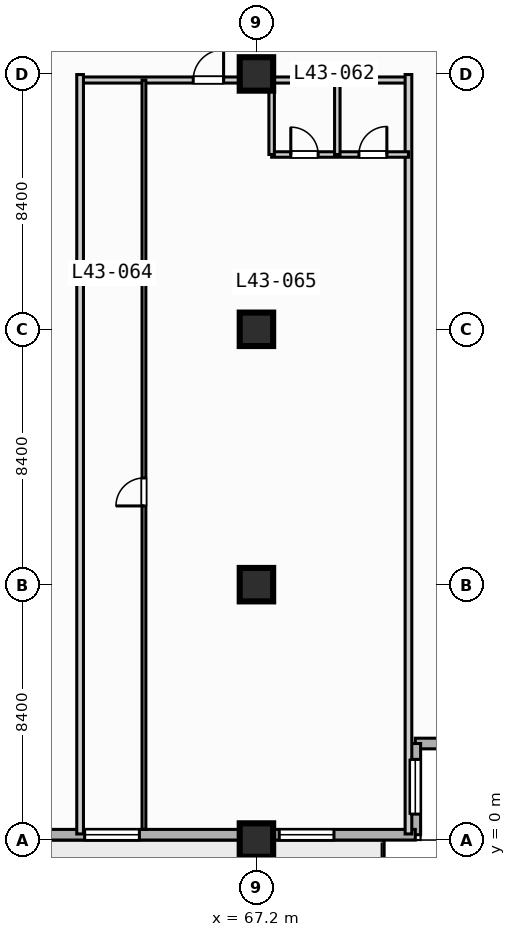
"""IFC4 building model, lengths in metres.
Left out: names, types, materials, properties, quantities, classifications, styles, units other than length and angle.
Written with IfcOpenShell. Run it as: python <this file> out.ifc"""

import sys

from ifc_helpers import new_model, si_unit, direction, frame, frame_2d, origin, origin_2d, place, context, subcontext, project, spatial, rectangle, extrude, element, fill, save


model = new_model("IFC4")
c1 = context("Model", 3, precision=1e-05, world=origin(), true_north=direction((0.0, 1.0)))
c2 = subcontext(c1, "Body", "Model", "MODEL_VIEW")
j1 = project(units=[si_unit("LENGTHUNIT", "METRE"), si_unit("PLANEANGLEUNIT", "RADIAN")], contexts=[c1])
p1 = place(None, origin())
s1 = spatial("IfcSite", under=j1, at=p1, CompositionType="ELEMENT")
p2 = place(p1, origin())
s2 = spatial("IfcBuilding", under=s1, at=p2, CompositionType="ELEMENT")
p3 = place(p2, frame((0.0, 0.0, 179.1)))
s3 = spatial("IfcBuildingStorey", under=s2, at=p3, CompositionType="ELEMENT", Elevation=179.1)
for number, where, z_axis, x_axis in (
    (1, (67.2, 0.0, 0.0), (0.0, 0.0, 1.0), (1.0, 0.0, 0.0)),
    (2, (67.2, 8.4, 0.0), (0.0, 0.0, 1.0), (1.0, 0.0, 0.0)),
    (3, (67.2, 16.8, 0.0), (0.0, 0.0, 1.0), (1.0, 0.0, 0.0)),
    (4, (67.2, 25.2, 0.0), (0.0, 0.0, 1.0), (1.0, 0.0, 0.0)),
):
    element("IfcColumn", number, at=place(p3, frame(where, z_axis=z_axis, x_axis=x_axis)), inside=s3, PredefinedType="COLUMN", context=c2, shape_type="SweptSolid", body=[
        extrude(rectangle(XDim=1.1, YDim=1.1, at=origin_2d()), origin(), (0.0, 0.0, 1.0), 3.7),
    ])
p4 = place(p3, frame((75.425, 3.175, 0.0), z_axis=(0.0, 0.0, 1.0), x_axis=(-1.0, 0.0, 0.0)))
e5 = element("IfcWall", 5, at=p4, inside=s3, PredefinedType="STANDARD", context=c2, shape_type="SweptSolid", body=[
    extrude(rectangle(XDim=3.0, YDim=0.35, at=frame_2d((1.5, 0.0))), origin(), (0.0, 0.0, 1.0), 3.47),
])
p5 = place(p3, frame((72.425, 3.175, 0.0), z_axis=(0.0, 0.0, 1.0), x_axis=(0.0, -1.0, 0.0)))
e6 = element("IfcWall", 6, at=p5, inside=s3, PredefinedType="STANDARD", context=c2, shape_type="SweptSolid", body=[
    extrude(rectangle(XDim=3.0, YDim=0.35, at=frame_2d((1.5, 0.0))), origin(), (0.0, 0.0, 1.0), 3.47),
])
p6 = place(p5, frame((0.522, 0.0, 0.85)))
e7 = element("IfcOpeningElement", 7, at=p6, cuts=e6, PredefinedType="OPENING", context=c2, shape_type="SweptSolid", body=[
    extrude(rectangle(XDim=1.8, YDim=1.8, at=frame_2d((0.9, 0.9))), frame((0.0, 0.185, 0.0), z_axis=(0.0, -1.0, 0.0), x_axis=(1.0, 0.0, 0.0)), (0.0, 0.0, 1.0), 0.37),
])
p7 = place(p3, frame((72.425, 0.175, 0.0), z_axis=(0.0, 0.0, 1.0), x_axis=(-1.0, 0.0, 0.0)))
e8 = element("IfcWall", 8, at=p7, inside=s3, PredefinedType="STANDARD", context=c2, shape_type="SweptSolid", body=[
    extrude(rectangle(XDim=69.25, YDim=0.35, at=frame_2d((34.625, 0.0))), origin(), (0.0, 0.0, 1.0), 3.47),
])
p8 = place(p7, frame((50.725, 0.0, 0.0)))
e9 = element("IfcOpeningElement", 9, at=p8, cuts=e8, PredefinedType="OPENING", context=c2, shape_type="SweptSolid", body=[
    extrude(rectangle(XDim=1.4, YDim=2.2, at=frame_2d((0.7, 1.1))), frame((0.0, 0.185, 0.0), z_axis=(0.0, -1.0, 0.0), x_axis=(1.0, 0.0, 0.0)), (0.0, 0.0, 1.0), 0.37),
])
p9 = place(p7, frame((58.625, 0.0, 0.85)))
e10 = element("IfcOpeningElement", 10, at=p9, cuts=e8, PredefinedType="OPENING", context=c2, shape_type="SweptSolid", body=[
    extrude(rectangle(XDim=2.4, YDim=1.95, at=frame_2d((1.2, 0.975))), frame((0.0, 0.185, 0.0), z_axis=(0.0, -1.0, 0.0), x_axis=(1.0, 0.0, 0.0)), (0.0, 0.0, 1.0), 0.37),
])
p10 = place(p7, frame((41.825, 0.0, 0.85)))
e11 = element("IfcOpeningElement", 11, at=p10, cuts=e8, PredefinedType="OPENING", context=c2, shape_type="SweptSolid", body=[
    extrude(rectangle(XDim=2.4, YDim=1.95, at=frame_2d((1.2, 0.975))), frame((0.0, 0.185, 0.0), z_axis=(0.0, -1.0, 0.0), x_axis=(1.0, 0.0, 0.0)), (0.0, 0.0, 1.0), 0.37),
])
p11 = place(p7, frame((33.725, 0.0, 0.85)))
e12 = element("IfcOpeningElement", 12, at=p11, cuts=e8, PredefinedType="OPENING", context=c2, shape_type="SweptSolid", body=[
    extrude(rectangle(XDim=1.8, YDim=1.8, at=frame_2d((0.9, 0.9))), frame((0.0, 0.185, 0.0), z_axis=(0.0, -1.0, 0.0), x_axis=(1.0, 0.0, 0.0)), (0.0, 0.0, 1.0), 0.37),
])
p12 = place(p7, frame((25.025, 0.0, 0.85)))
e13 = element("IfcOpeningElement", 13, at=p12, cuts=e8, PredefinedType="OPENING", context=c2, shape_type="SweptSolid", body=[
    extrude(rectangle(XDim=2.4, YDim=1.95, at=frame_2d((1.2, 0.975))), frame((0.0, 0.185, 0.0), z_axis=(0.0, -1.0, 0.0), x_axis=(1.0, 0.0, 0.0)), (0.0, 0.0, 1.0), 0.37),
])
p13 = place(p7, frame((67.075, 0.0, 0.85)))
e14 = element("IfcOpeningElement", 14, at=p13, cuts=e8, PredefinedType="OPENING", context=c2, shape_type="SweptSolid", body=[
    extrude(rectangle(XDim=1.8, YDim=1.8, at=frame_2d((0.9, 0.9))), frame((0.0, 0.185, 0.0), z_axis=(0.0, -1.0, 0.0), x_axis=(1.0, 0.0, 0.0)), (0.0, 0.0, 1.0), 0.37),
])
p14 = place(p7, frame((56.39, 0.0, 0.85)))
e15 = element("IfcOpeningElement", 15, at=p14, cuts=e8, PredefinedType="OPENING", context=c2, shape_type="SweptSolid", body=[
    extrude(rectangle(XDim=0.72, YDim=1.8, at=frame_2d((0.36, 0.9))), frame((0.0, 0.185, 0.0), z_axis=(0.0, -1.0, 0.0), x_axis=(1.0, 0.0, 0.0)), (0.0, 0.0, 1.0), 0.37),
])
p15 = place(p7, frame((9.075, 0.0, 0.85)))
e16 = element("IfcOpeningElement", 16, at=p15, cuts=e8, PredefinedType="OPENING", context=c2, shape_type="SweptSolid", body=[
    extrude(rectangle(XDim=1.8, YDim=1.8, at=frame_2d((0.9, 0.9))), frame((0.0, 0.185, 0.0), z_axis=(0.0, -1.0, 0.0), x_axis=(1.0, 0.0, 0.0)), (0.0, 0.0, 1.0), 0.37),
])
p16 = place(p7, frame((2.675, 0.0, 0.85)))
e17 = element("IfcOpeningElement", 17, at=p16, cuts=e8, PredefinedType="OPENING", context=c2, shape_type="SweptSolid", body=[
    extrude(rectangle(XDim=1.8, YDim=1.8, at=frame_2d((0.9, 0.9))), frame((0.0, 0.185, 0.0), z_axis=(0.0, -1.0, 0.0), x_axis=(1.0, 0.0, 0.0)), (0.0, 0.0, 1.0), 0.37),
])
p17 = place(p3, frame((61.4, 25.0, 0.0), z_axis=(0.0, 0.0, 1.0), x_axis=(1.0, 0.0, 0.0)))
e18 = element("IfcWall", 18, at=p17, inside=s3, PredefinedType="PARTITIONING", context=c2, shape_type="SweptSolid", body=[
    extrude(rectangle(XDim=10.8, YDim=0.2, at=frame_2d((5.4, 0.0))), origin(), (0.0, 0.0, 1.0), 2.82),
])
p18 = place(p17, frame((3.72, 0.0, 0.0)))
e19 = element("IfcOpeningElement", 19, at=p18, cuts=e18, PredefinedType="OPENING", context=c2, shape_type="SweptSolid", body=[
    extrude(rectangle(XDim=1.0, YDim=2.15, at=frame_2d((0.5, 1.075))), frame((0.0, 0.11, 0.0), z_axis=(0.0, -1.0, 0.0), x_axis=(1.0, 0.0, 0.0)), (0.0, 0.0, 1.0), 0.22),
])
for number, where, z_axis, x_axis in (
    (20, (61.4, 0.2, 0.0), (0.0, 0.0, 1.0), (0.0, 1.0, 0.0)),
    (21, (72.2, 0.2, 0.0), (0.0, 0.0, 1.0), (0.0, 1.0, 0.0)),
):
    element("IfcWall", number, at=place(p3, frame(where, z_axis=z_axis, x_axis=x_axis)), inside=s3, PredefinedType="PARTITIONING", context=c2, shape_type="SweptSolid", body=[
        extrude(rectangle(XDim=24.98, YDim=0.22, at=frame_2d((12.49, 0.0))), origin(), (0.0, 0.0, 1.0), 3.47),
    ])
p19 = place(p3, frame((67.7, 22.55, 0.0), z_axis=(0.0, 0.0, 1.0), x_axis=(1.0, 0.0, 0.0)))
e22 = element("IfcWall", 22, at=p19, inside=s3, PredefinedType="PLUMBINGWALL", context=c2, shape_type="SweptSolid", body=[
    extrude(rectangle(XDim=4.5, YDim=0.18, at=frame_2d((2.25, 0.0))), origin(), (0.0, 0.0, 1.0), 3.47),
])
p20 = place(p19, frame((0.63, 0.0, 0.0)))
e23 = element("IfcOpeningElement", 23, at=p20, cuts=e22, PredefinedType="OPENING", context=c2, shape_type="SweptSolid", body=[
    extrude(rectangle(XDim=0.9, YDim=2.1, at=frame_2d((0.45, 1.05))), frame((0.0, 0.1, 0.0), z_axis=(0.0, -1.0, 0.0), x_axis=(1.0, 0.0, 0.0)), (0.0, 0.0, 1.0), 0.2),
])
p21 = place(p19, frame((2.87, 0.0, 0.0)))
e24 = element("IfcOpeningElement", 24, at=p21, cuts=e22, PredefinedType="OPENING", context=c2, shape_type="SweptSolid", body=[
    extrude(rectangle(XDim=0.92, YDim=2.1, at=frame_2d((0.46, 1.05))), frame((0.0, 0.1, 0.0), z_axis=(0.0, -1.0, 0.0), x_axis=(1.0, 0.0, 0.0)), (0.0, 0.0, 1.0), 0.2),
])
for number, where, z_axis, x_axis in (
    (25, (67.7, 22.55, 0.0), (0.0, 0.0, 1.0), (0.0, 1.0, 0.0)),
    (26, (69.86, 22.55, 0.0), (0.0, 0.0, 1.0), (0.0, 1.0, 0.0)),
):
    element("IfcWall", number, at=place(p3, frame(where, z_axis=z_axis, x_axis=x_axis)), inside=s3, PredefinedType="PLUMBINGWALL", context=c2, shape_type="SweptSolid", body=[
        extrude(rectangle(XDim=2.45, YDim=0.18, at=frame_2d((1.225, 0.0))), origin(), (0.0, 0.0, 1.0), 3.47),
    ])
p22 = place(p3, frame((63.5, 0.35, 0.0), z_axis=(0.0, 0.0, 1.0), x_axis=(0.0, 1.0, 0.0)))
e27 = element("IfcWall", 27, at=p22, inside=s3, PredefinedType="PARTITIONING", context=c2, shape_type="SweptSolid", body=[
    extrude(rectangle(XDim=24.65, YDim=0.125, at=frame_2d((12.325, 0.0))), origin(), (0.0, 0.0, 1.0), 3.47),
])
p23 = place(p22, frame((10.64, 0.0, 0.0)))
e28 = element("IfcOpeningElement", 28, at=p23, cuts=e27, PredefinedType="OPENING", context=c2, shape_type="SweptSolid", body=[
    extrude(rectangle(XDim=0.92, YDim=2.1, at=frame_2d((0.46, 1.05))), frame((0.0, 0.073, 0.0), z_axis=(0.0, -1.0, 0.0), x_axis=(1.0, 0.0, 0.0)), (0.0, 0.0, 1.0), 0.145),
])
p24 = place(p6, origin())
e29 = element("IfcWindow", 29, at=p24, inside=s3, PartitioningType="SINGLE_PANEL", PredefinedType="WINDOW", context=c2, shape_type="SweptSolid", body=[
    extrude(rectangle(XDim=1.8, YDim=1.8, at=frame_2d((0.9, 0.9))), frame((0.0, 0.03, 0.0), z_axis=(0.0, -1.0, 0.0), x_axis=(1.0, 0.0, 0.0)), (0.0, 0.0, 1.0), 0.06),
])
fill(e7, e29)
p25 = place(p15, origin())
e30 = element("IfcWindow", 30, at=p25, inside=s3, PartitioningType="SINGLE_PANEL", PredefinedType="WINDOW", context=c2, shape_type="SweptSolid", body=[
    extrude(rectangle(XDim=1.8, YDim=1.8, at=frame_2d((0.9, 0.9))), frame((0.0, 0.03, 0.0), z_axis=(0.0, -1.0, 0.0), x_axis=(1.0, 0.0, 0.0)), (0.0, 0.0, 1.0), 0.06),
])
fill(e16, e30)
p26 = place(p16, origin())
e31 = element("IfcWindow", 31, at=p26, inside=s3, PartitioningType="SINGLE_PANEL", PredefinedType="WINDOW", context=c2, shape_type="SweptSolid", body=[
    extrude(rectangle(XDim=1.8, YDim=1.8, at=frame_2d((0.9, 0.9))), frame((0.0, 0.03, 0.0), z_axis=(0.0, -1.0, 0.0), x_axis=(1.0, 0.0, 0.0)), (0.0, 0.0, 1.0), 0.06),
])
fill(e17, e31)
p27 = place(p18, origin())
e32 = element("IfcDoor", 32, at=p27, inside=s3, OperationType="SINGLE_SWING_RIGHT", PredefinedType="DOOR", context=c2, shape_type="SweptSolid", body=[
    extrude(rectangle(XDim=1.0, YDim=2.15, at=frame_2d((0.5, 1.075))), frame((0.0, 0.025, 0.0), z_axis=(0.0, -1.0, 0.0), x_axis=(1.0, 0.0, 0.0)), (0.0, 0.0, 1.0), 0.05),
])
fill(e19, e32)
p28 = place(p20, origin())
e33 = element("IfcDoor", 33, at=p28, inside=s3, OperationType="SINGLE_SWING_LEFT", PredefinedType="DOOR", context=c2, shape_type="SweptSolid", body=[
    extrude(rectangle(XDim=0.9, YDim=2.1, at=frame_2d((0.45, 1.05))), frame((0.0, 0.025, 0.0), z_axis=(0.0, -1.0, 0.0), x_axis=(1.0, 0.0, 0.0)), (0.0, 0.0, 1.0), 0.05),
])
fill(e23, e33)
p29 = place(p21, origin())
e34 = element("IfcDoor", 34, at=p29, inside=s3, OperationType="SINGLE_SWING_RIGHT", PredefinedType="DOOR", context=c2, shape_type="SweptSolid", body=[
    extrude(rectangle(XDim=0.92, YDim=2.1, at=frame_2d((0.46, 1.05))), frame((0.0, 0.025, 0.0), z_axis=(0.0, -1.0, 0.0), x_axis=(1.0, 0.0, 0.0)), (0.0, 0.0, 1.0), 0.05),
])
fill(e24, e34)
p30 = place(p23, origin())
e35 = element("IfcDoor", 35, at=p30, inside=s3, OperationType="SINGLE_SWING_LEFT", PredefinedType="DOOR", context=c2, shape_type="SweptSolid", body=[
    extrude(rectangle(XDim=0.92, YDim=2.1, at=frame_2d((0.46, 1.05))), frame((0.0, 0.025, 0.0), z_axis=(0.0, -1.0, 0.0), x_axis=(1.0, 0.0, 0.0)), (0.0, 0.0, 1.0), 0.05),
])
fill(e28, e35)
save(model, sys.argv[1])
